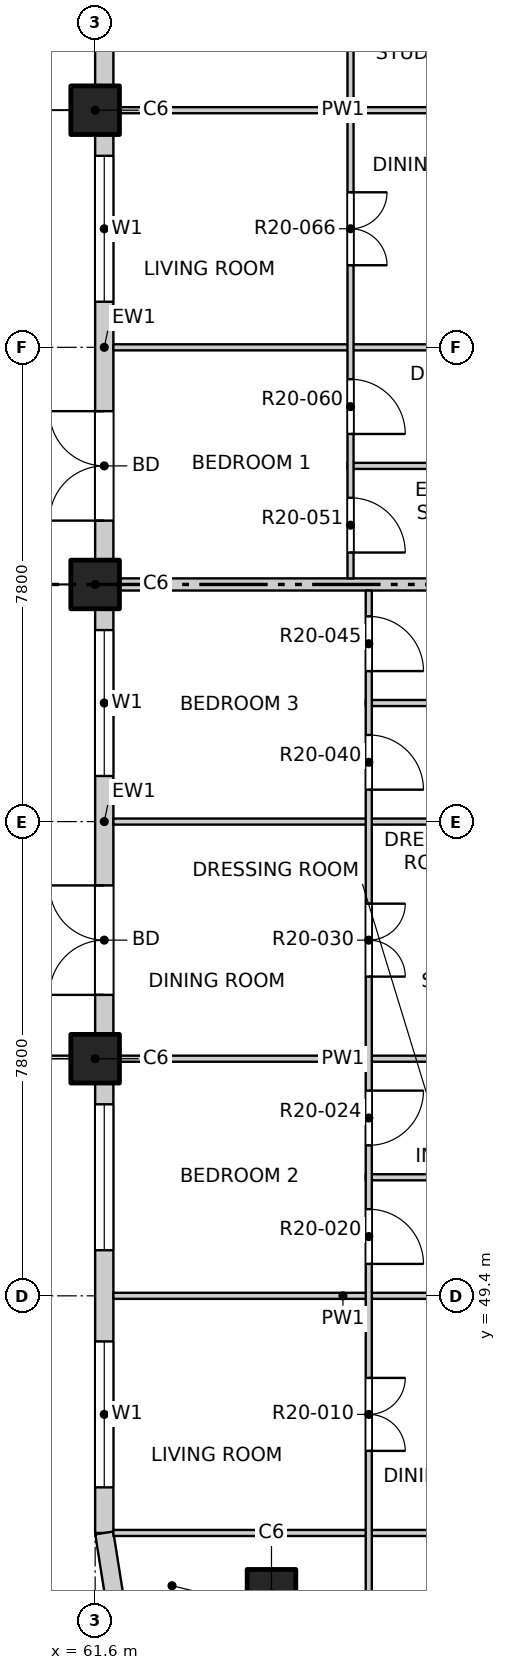
"""IFC4 building model, lengths in metres.
Left out: names, types, materials, properties, quantities, classifications, styles, units other than length and angle.
Written with IfcOpenShell. Run it as: python <this file> out.ifc"""

import sys

from ifc_helpers import new_model, si_unit, direction, frame, frame_2d, origin, origin_2d, place, context, subcontext, project, spatial, rectangle, extrude, element, fill, save


model = new_model("IFC4")
c1 = context("Model", 3, precision=1e-05, world=origin(), true_north=direction((0.0, 1.0)))
c2 = subcontext(c1, "Body", "Model", "MODEL_VIEW")
j1 = project(units=[si_unit("LENGTHUNIT", "METRE"), si_unit("PLANEANGLEUNIT", "RADIAN")], contexts=[c1])
p1 = place(None, origin())
s1 = spatial("IfcSite", under=j1, at=p1, CompositionType="ELEMENT")
p2 = place(p1, origin())
s2 = spatial("IfcBuilding", under=s1, at=p2, CompositionType="ELEMENT")
p3 = place(p2, frame((0.0, 0.0, 210.9)))
s3 = spatial("IfcBuildingStorey", under=s2, at=p3, CompositionType="ELEMENT", Elevation=210.9)
for number, where, z_axis, x_axis in (
    (1, (64.5, 44.5, -0.25), (0.0, 0.0, 1.0), (1.0, 0.0, 0.0)),
    (2, (61.6, 53.3, -0.25), (0.0, 0.0, 1.0), (1.0, 0.0, 0.0)),
    (3, (61.6, 61.1, -0.25), (0.0, 0.0, 1.0), (1.0, 0.0, 0.0)),
    (4, (61.6, 68.9, -0.25), (0.0, 0.0, 1.0), (1.0, 0.0, 0.0)),
):
    element("IfcColumn", number, at=place(p3, frame(where, z_axis=z_axis, x_axis=x_axis)), inside=s3, PredefinedType="COLUMN", context=c2, shape_type="SweptSolid", body=[
        extrude(rectangle(XDim=0.8, YDim=0.8, at=origin_2d()), origin(), (0.0, 0.0, 1.0), 3.4),
    ])
p4 = place(p3, frame((61.75, 45.5, 0.0), z_axis=(0.0, 0.0, 1.0), x_axis=(0.0, 1.0, 0.0)))
e5 = element("IfcWall", 5, at=p4, inside=s3, PredefinedType="SOLIDWALL", context=c2, shape_type="SweptSolid", body=[
    extrude(rectangle(XDim=7.4, YDim=0.3, at=frame_2d((3.7, 0.0))), origin(), (0.0, 0.0, 1.0), 2.7),
])
p5 = place(p4, frame((0.75, 0.0, 0.9)))
e6 = element("IfcOpeningElement", 6, at=p5, cuts=e5, PredefinedType="OPENING", context=c2, shape_type="SweptSolid", body=[
    extrude(rectangle(XDim=2.4, YDim=1.8, at=frame_2d((1.2, 0.9))), frame((0.0, 0.16, 0.0), z_axis=(0.0, -1.0, 0.0), x_axis=(1.0, 0.0, 0.0)), (0.0, 0.0, 1.0), 0.32),
])
p6 = place(p4, frame((4.65, 0.0, 0.9)))
e7 = element("IfcOpeningElement", 7, at=p6, cuts=e5, PredefinedType="OPENING", context=c2, shape_type="SweptSolid", body=[
    extrude(rectangle(XDim=2.4, YDim=1.8, at=frame_2d((1.2, 0.9))), frame((0.0, 0.16, 0.0), z_axis=(0.0, -1.0, 0.0), x_axis=(1.0, 0.0, 0.0)), (0.0, 0.0, 1.0), 0.32),
])
p7 = place(p3, frame((61.75, 53.7, 0.0), z_axis=(0.0, 0.0, 1.0), x_axis=(0.0, 1.0, 0.0)))
e8 = element("IfcWall", 8, at=p7, inside=s3, PredefinedType="SOLIDWALL", context=c2, shape_type="SweptSolid", body=[
    extrude(rectangle(XDim=7.0, YDim=0.3, at=frame_2d((3.5, 0.0))), origin(), (0.0, 0.0, 1.0), 2.7),
])
p8 = place(p7, frame((0.65, 0.0, 0.0)))
e9 = element("IfcOpeningElement", 9, at=p8, cuts=e8, PredefinedType="OPENING", context=c2, shape_type="SweptSolid", body=[
    extrude(rectangle(XDim=1.8, YDim=2.4, at=frame_2d((0.9, 1.2))), frame((0.0, 0.16, 0.0), z_axis=(0.0, -1.0, 0.0), x_axis=(1.0, 0.0, 0.0)), (0.0, 0.0, 1.0), 0.32),
])
p9 = place(p7, frame((4.25, 0.0, 0.9)))
e10 = element("IfcOpeningElement", 10, at=p9, cuts=e8, PredefinedType="OPENING", context=c2, shape_type="SweptSolid", body=[
    extrude(rectangle(XDim=2.4, YDim=1.8, at=frame_2d((1.2, 0.9))), frame((0.0, 0.16, 0.0), z_axis=(0.0, -1.0, 0.0), x_axis=(1.0, 0.0, 0.0)), (0.0, 0.0, 1.0), 0.32),
])
p10 = place(p3, frame((61.75, 61.5, 0.0), z_axis=(0.0, 0.0, 1.0), x_axis=(0.0, 1.0, 0.0)))
e11 = element("IfcWall", 11, at=p10, inside=s3, PredefinedType="SOLIDWALL", context=c2, shape_type="SweptSolid", body=[
    extrude(rectangle(XDim=7.0, YDim=0.3, at=frame_2d((3.5, 0.0))), origin(), (0.0, 0.0, 1.0), 2.7),
])
p11 = place(p10, frame((0.65, 0.0, 0.0)))
e12 = element("IfcOpeningElement", 12, at=p11, cuts=e11, PredefinedType="OPENING", context=c2, shape_type="SweptSolid", body=[
    extrude(rectangle(XDim=1.8, YDim=2.4, at=frame_2d((0.9, 1.2))), frame((0.0, 0.16, 0.0), z_axis=(0.0, -1.0, 0.0), x_axis=(1.0, 0.0, 0.0)), (0.0, 0.0, 1.0), 0.32),
])
p12 = place(p10, frame((4.25, 0.0, 0.9)))
e13 = element("IfcOpeningElement", 13, at=p12, cuts=e11, PredefinedType="OPENING", context=c2, shape_type="SweptSolid", body=[
    extrude(rectangle(XDim=2.4, YDim=1.8, at=frame_2d((1.2, 0.9))), frame((0.0, 0.16, 0.0), z_axis=(0.0, -1.0, 0.0), x_axis=(1.0, 0.0, 0.0)), (0.0, 0.0, 1.0), 0.32),
])
p13 = place(p3, frame((61.75, 69.3, 0.0), z_axis=(0.0, 0.0, 1.0), x_axis=(0.0, 1.0, 0.0)))
e14 = element("IfcWall", 14, at=p13, inside=s3, PredefinedType="SOLIDWALL", context=c2, shape_type="SweptSolid", body=[
    extrude(rectangle(XDim=7.0, YDim=0.3, at=frame_2d((3.5, 0.0))), origin(), (0.0, 0.0, 1.0), 2.7),
])
p14 = place(p13, frame((0.65, 0.0, 0.0)))
e15 = element("IfcOpeningElement", 15, at=p14, cuts=e14, PredefinedType="OPENING", context=c2, shape_type="SweptSolid", body=[
    extrude(rectangle(XDim=1.8, YDim=2.4, at=frame_2d((0.9, 1.2))), frame((0.0, 0.16, 0.0), z_axis=(0.0, -1.0, 0.0), x_axis=(1.0, 0.0, 0.0)), (0.0, 0.0, 1.0), 0.32),
])
p15 = place(p13, frame((4.25, 0.0, 0.9)))
e16 = element("IfcOpeningElement", 16, at=p15, cuts=e14, PredefinedType="OPENING", context=c2, shape_type="SweptSolid", body=[
    extrude(rectangle(XDim=2.4, YDim=1.8, at=frame_2d((1.2, 0.9))), frame((0.0, 0.16, 0.0), z_axis=(0.0, -1.0, 0.0), x_axis=(1.0, 0.0, 0.0)), (0.0, 0.0, 1.0), 0.32),
])
p16 = place(p3, frame((61.75, 45.5, 0.0), z_axis=(0.0, 0.0, 1.0), x_axis=(0.156496880861, -0.987678452879, 0.0)))
e17 = element("IfcWall", 17, at=p16, inside=s3, PredefinedType="SOLIDWALL", context=c2, shape_type="SweptSolid", body=[
    extrude(rectangle(XDim=1.173, YDim=0.3, at=frame_2d((0.586, 0.0))), origin(), (0.0, 0.0, 1.0), 2.7),
])
p17 = place(p3, frame((61.9, 45.5, 0.0), z_axis=(0.0, 0.0, 1.0), x_axis=(1.0, 0.0, 0.0)))
e18 = element("IfcWall", 18, at=p17, inside=s3, PredefinedType="PARTITIONING", context=c2, shape_type="SweptSolid", body=[
    extrude(rectangle(XDim=11.475, YDim=0.1, at=frame_2d((5.737, 0.0))), origin(), (0.0, 0.0, 1.0), 3.15),
])
p18 = place(p17, frame((7.965, 0.0, 0.0)))
e19 = element("IfcOpeningElement", 19, at=p18, cuts=e18, PredefinedType="OPENING", context=c2, shape_type="SweptSolid", body=[
    extrude(rectangle(XDim=0.9, YDim=2.1, at=frame_2d((0.45, 1.05))), frame((0.0, 0.06, 0.0), z_axis=(0.0, -1.0, 0.0), x_axis=(1.0, 0.0, 0.0)), (0.0, 0.0, 1.0), 0.12),
])
p19 = place(p3, frame((61.9, 49.4, 0.0), z_axis=(0.0, 0.0, 1.0), x_axis=(1.0, 0.0, 0.0)))
e20 = element("IfcWall", 20, at=p19, inside=s3, PredefinedType="PARTITIONING", context=c2, shape_type="SweptSolid", body=[
    extrude(rectangle(XDim=7.55, YDim=0.1, at=frame_2d((3.775, 0.0))), origin(), (0.0, 0.0, 1.0), 3.15),
])
p20 = place(p3, frame((66.05, 51.35, 0.0), z_axis=(0.0, 0.0, 1.0), x_axis=(1.0, 0.0, 0.0)))
e21 = element("IfcWall", 21, at=p20, inside=s3, PredefinedType="PARTITIONING", context=c2, shape_type="SweptSolid", body=[
    extrude(rectangle(XDim=3.4, YDim=0.1, at=frame_2d((1.7, 0.0))), origin(), (0.0, 0.0, 1.0), 3.15),
])
for number, where, z_axis, x_axis in (
    (22, (61.9, 53.3, 0.0), (0.0, 0.0, 1.0), (1.0, 0.0, 0.0)),
    (23, (61.9, 57.2, 0.0), (0.0, 0.0, 1.0), (1.0, 0.0, 0.0)),
):
    element("IfcWall", number, at=place(p3, frame(where, z_axis=z_axis, x_axis=x_axis)), inside=s3, PredefinedType="PARTITIONING", context=c2, shape_type="SweptSolid", body=[
        extrude(rectangle(XDim=7.55, YDim=0.1, at=frame_2d((3.775, 0.0))), origin(), (0.0, 0.0, 1.0), 3.15),
    ])
p21 = place(p3, frame((66.05, 59.15, 0.0), z_axis=(0.0, 0.0, 1.0), x_axis=(1.0, 0.0, 0.0)))
e24 = element("IfcWall", 24, at=p21, inside=s3, PredefinedType="PARTITIONING", context=c2, shape_type="SweptSolid", body=[
    extrude(rectangle(XDim=3.4, YDim=0.1, at=frame_2d((1.7, 0.0))), origin(), (0.0, 0.0, 1.0), 3.15),
])
p22 = place(p3, frame((61.9, 61.1, 0.0), z_axis=(0.0, 0.0, 1.0), x_axis=(1.0, 0.0, 0.0)))
e25 = element("IfcWall", 25, at=p22, inside=s3, PredefinedType="PARTITIONING", context=c2, shape_type="SweptSolid", body=[
    extrude(rectangle(XDim=11.5, YDim=0.2, at=frame_2d((5.75, 0.0))), origin(), (0.0, 0.0, 1.0), 2.55),
])
p23 = place(p3, frame((65.75, 63.05, 0.0), z_axis=(0.0, 0.0, 1.0), x_axis=(1.0, 0.0, 0.0)))
e26 = element("IfcWall", 26, at=p23, inside=s3, PredefinedType="PARTITIONING", context=c2, shape_type="SweptSolid", body=[
    extrude(rectangle(XDim=3.7, YDim=0.1, at=frame_2d((1.85, 0.0))), origin(), (0.0, 0.0, 1.0), 3.15),
])
p24 = place(p3, frame((61.9, 65.0, 0.0), z_axis=(0.0, 0.0, 1.0), x_axis=(1.0, 0.0, 0.0)))
e27 = element("IfcWall", 27, at=p24, inside=s3, PredefinedType="PARTITIONING", context=c2, shape_type="SweptSolid", body=[
    extrude(rectangle(XDim=7.55, YDim=0.1, at=frame_2d((3.775, 0.0))), origin(), (0.0, 0.0, 1.0), 3.15),
])
p25 = place(p3, frame((61.9, 68.9, 0.0), z_axis=(0.0, 0.0, 1.0), x_axis=(1.0, 0.0, 0.0)))
e28 = element("IfcWall", 28, at=p25, inside=s3, PredefinedType="PARTITIONING", context=c2, shape_type="SweptSolid", body=[
    extrude(rectangle(XDim=7.55, YDim=0.1, at=frame_2d((3.775, 0.0))), origin(), (0.0, 0.0, 1.0), 2.55),
])
p26 = place(p3, frame((65.8, 61.2, 0.0), z_axis=(0.0, 0.0, 1.0), x_axis=(0.0, 1.0, 0.0)))
e29 = element("IfcWall", 29, at=p26, inside=s3, PredefinedType="PARTITIONING", context=c2, shape_type="SweptSolid", body=[
    extrude(rectangle(XDim=26.9, YDim=0.1, at=frame_2d((13.45, 0.0))), origin(), (0.0, 0.0, 1.0), 3.15),
])
p27 = place(p26, frame((0.425, 0.0, 0.0)))
e30 = element("IfcOpeningElement", 30, at=p27, cuts=e29, PredefinedType="OPENING", context=c2, shape_type="SweptSolid", body=[
    extrude(rectangle(XDim=0.9, YDim=2.1, at=frame_2d((0.45, 1.05))), frame((0.0, 0.06, 0.0), z_axis=(0.0, -1.0, 0.0), x_axis=(1.0, 0.0, 0.0)), (0.0, 0.0, 1.0), 0.12),
])
p28 = place(p26, frame((2.375, 0.0, 0.0)))
e31 = element("IfcOpeningElement", 31, at=p28, cuts=e29, PredefinedType="OPENING", context=c2, shape_type="SweptSolid", body=[
    extrude(rectangle(XDim=0.9, YDim=2.1, at=frame_2d((0.45, 1.05))), frame((0.0, 0.06, 0.0), z_axis=(0.0, -1.0, 0.0), x_axis=(1.0, 0.0, 0.0)), (0.0, 0.0, 1.0), 0.12),
])
p29 = place(p26, frame((5.15, 0.0, 0.0)))
e32 = element("IfcOpeningElement", 32, at=p29, cuts=e29, PredefinedType="OPENING", context=c2, shape_type="SweptSolid", body=[
    extrude(rectangle(XDim=1.2, YDim=2.1, at=frame_2d((0.6, 1.05))), frame((0.0, 0.06, 0.0), z_axis=(0.0, -1.0, 0.0), x_axis=(1.0, 0.0, 0.0)), (0.0, 0.0, 1.0), 0.12),
])
p30 = place(p26, frame((9.05, 0.0, 0.0)))
e33 = element("IfcOpeningElement", 33, at=p30, cuts=e29, PredefinedType="OPENING", context=c2, shape_type="SweptSolid", body=[
    extrude(rectangle(XDim=1.2, YDim=2.1, at=frame_2d((0.6, 1.05))), frame((0.0, 0.06, 0.0), z_axis=(0.0, -1.0, 0.0), x_axis=(1.0, 0.0, 0.0)), (0.0, 0.0, 1.0), 0.12),
])
p31 = place(p26, frame((12.125, 0.0, 0.0)))
e34 = element("IfcOpeningElement", 34, at=p31, cuts=e29, PredefinedType="OPENING", context=c2, shape_type="SweptSolid", body=[
    extrude(rectangle(XDim=0.9, YDim=2.1, at=frame_2d((0.45, 1.05))), frame((0.0, 0.06, 0.0), z_axis=(0.0, -1.0, 0.0), x_axis=(1.0, 0.0, 0.0)), (0.0, 0.0, 1.0), 0.12),
])
p32 = place(p26, frame((14.075, 0.0, 0.0)))
e35 = element("IfcOpeningElement", 35, at=p32, cuts=e29, PredefinedType="OPENING", context=c2, shape_type="SweptSolid", body=[
    extrude(rectangle(XDim=0.9, YDim=2.1, at=frame_2d((0.45, 1.05))), frame((0.0, 0.06, 0.0), z_axis=(0.0, -1.0, 0.0), x_axis=(1.0, 0.0, 0.0)), (0.0, 0.0, 1.0), 0.12),
])
p33 = place(p26, frame((16.025, 0.0, 0.0)))
e36 = element("IfcOpeningElement", 36, at=p33, cuts=e29, PredefinedType="OPENING", context=c2, shape_type="SweptSolid", body=[
    extrude(rectangle(XDim=0.9, YDim=2.1, at=frame_2d((0.45, 1.05))), frame((0.0, 0.06, 0.0), z_axis=(0.0, -1.0, 0.0), x_axis=(1.0, 0.0, 0.0)), (0.0, 0.0, 1.0), 0.12),
])
p34 = place(p26, frame((17.975, 0.0, 0.0)))
e37 = element("IfcOpeningElement", 37, at=p34, cuts=e29, PredefinedType="OPENING", context=c2, shape_type="SweptSolid", body=[
    extrude(rectangle(XDim=0.9, YDim=2.1, at=frame_2d((0.45, 1.05))), frame((0.0, 0.06, 0.0), z_axis=(0.0, -1.0, 0.0), x_axis=(1.0, 0.0, 0.0)), (0.0, 0.0, 1.0), 0.12),
])
p35 = place(p26, frame((20.75, 0.0, 0.0)))
e38 = element("IfcOpeningElement", 38, at=p35, cuts=e29, PredefinedType="OPENING", context=c2, shape_type="SweptSolid", body=[
    extrude(rectangle(XDim=1.2, YDim=2.1, at=frame_2d((0.6, 1.05))), frame((0.0, 0.06, 0.0), z_axis=(0.0, -1.0, 0.0), x_axis=(1.0, 0.0, 0.0)), (0.0, 0.0, 1.0), 0.12),
])
p36 = place(p26, frame((24.65, 0.0, 0.0)))
e39 = element("IfcOpeningElement", 39, at=p36, cuts=e29, PredefinedType="OPENING", context=c2, shape_type="SweptSolid", body=[
    extrude(rectangle(XDim=1.2, YDim=2.1, at=frame_2d((0.6, 1.05))), frame((0.0, 0.06, 0.0), z_axis=(0.0, -1.0, 0.0), x_axis=(1.0, 0.0, 0.0)), (0.0, 0.0, 1.0), 0.12),
])
p37 = place(p3, frame((66.1, 41.9, 0.0), z_axis=(0.0, 0.0, 1.0), x_axis=(0.0, 1.0, 0.0)))
e40 = element("IfcWall", 40, at=p37, inside=s3, PredefinedType="PARTITIONING", context=c2, shape_type="SweptSolid", body=[
    extrude(rectangle(XDim=19.1, YDim=0.1, at=frame_2d((9.55, 0.0))), origin(), (0.0, 0.0, 1.0), 3.15),
])
p38 = place(p37, frame((1.05, 0.0, 0.0)))
e41 = element("IfcOpeningElement", 41, at=p38, cuts=e40, PredefinedType="OPENING", context=c2, shape_type="SweptSolid", body=[
    extrude(rectangle(XDim=1.2, YDim=2.1, at=frame_2d((0.6, 1.05))), frame((0.0, 0.06, 0.0), z_axis=(0.0, -1.0, 0.0), x_axis=(1.0, 0.0, 0.0)), (0.0, 0.0, 1.0), 0.12),
])
p39 = place(p37, frame((4.95, 0.0, 0.0)))
e42 = element("IfcOpeningElement", 42, at=p39, cuts=e40, PredefinedType="OPENING", context=c2, shape_type="SweptSolid", body=[
    extrude(rectangle(XDim=1.2, YDim=2.1, at=frame_2d((0.6, 1.05))), frame((0.0, 0.06, 0.0), z_axis=(0.0, -1.0, 0.0), x_axis=(1.0, 0.0, 0.0)), (0.0, 0.0, 1.0), 0.12),
])
p40 = place(p37, frame((8.025, 0.0, 0.0)))
e43 = element("IfcOpeningElement", 43, at=p40, cuts=e40, PredefinedType="OPENING", context=c2, shape_type="SweptSolid", body=[
    extrude(rectangle(XDim=0.9, YDim=2.1, at=frame_2d((0.45, 1.05))), frame((0.0, 0.06, 0.0), z_axis=(0.0, -1.0, 0.0), x_axis=(1.0, 0.0, 0.0)), (0.0, 0.0, 1.0), 0.12),
])
p41 = place(p37, frame((9.975, 0.0, 0.0)))
e44 = element("IfcOpeningElement", 44, at=p41, cuts=e40, PredefinedType="OPENING", context=c2, shape_type="SweptSolid", body=[
    extrude(rectangle(XDim=0.9, YDim=2.1, at=frame_2d((0.45, 1.05))), frame((0.0, 0.06, 0.0), z_axis=(0.0, -1.0, 0.0), x_axis=(1.0, 0.0, 0.0)), (0.0, 0.0, 1.0), 0.12),
])
p42 = place(p37, frame((12.75, 0.0, 0.0)))
e45 = element("IfcOpeningElement", 45, at=p42, cuts=e40, PredefinedType="OPENING", context=c2, shape_type="SweptSolid", body=[
    extrude(rectangle(XDim=1.2, YDim=2.1, at=frame_2d((0.6, 1.05))), frame((0.0, 0.06, 0.0), z_axis=(0.0, -1.0, 0.0), x_axis=(1.0, 0.0, 0.0)), (0.0, 0.0, 1.0), 0.12),
])
p43 = place(p37, frame((15.825, 0.0, 0.0)))
e46 = element("IfcOpeningElement", 46, at=p43, cuts=e40, PredefinedType="OPENING", context=c2, shape_type="SweptSolid", body=[
    extrude(rectangle(XDim=0.9, YDim=2.1, at=frame_2d((0.45, 1.05))), frame((0.0, 0.06, 0.0), z_axis=(0.0, -1.0, 0.0), x_axis=(1.0, 0.0, 0.0)), (0.0, 0.0, 1.0), 0.12),
])
p44 = place(p37, frame((17.775, 0.0, 0.0)))
e47 = element("IfcOpeningElement", 47, at=p44, cuts=e40, PredefinedType="OPENING", context=c2, shape_type="SweptSolid", body=[
    extrude(rectangle(XDim=0.9, YDim=2.1, at=frame_2d((0.45, 1.05))), frame((0.0, 0.06, 0.0), z_axis=(0.0, -1.0, 0.0), x_axis=(1.0, 0.0, 0.0)), (0.0, 0.0, 1.0), 0.12),
])
p45 = place(p5, origin())
e48 = element("IfcWindow", 48, at=p45, inside=s3, PartitioningType="DOUBLE_PANEL_VERTICAL", PredefinedType="WINDOW", context=c2, shape_type="SweptSolid", body=[
    extrude(rectangle(XDim=2.4, YDim=1.8, at=frame_2d((1.2, 0.9))), frame((0.0, 0.03, 0.0), z_axis=(0.0, -1.0, 0.0), x_axis=(1.0, 0.0, 0.0)), (0.0, 0.0, 1.0), 0.06),
])
fill(e6, e48)
p46 = place(p6, origin())
e49 = element("IfcWindow", 49, at=p46, inside=s3, PartitioningType="DOUBLE_PANEL_VERTICAL", PredefinedType="WINDOW", context=c2, shape_type="SweptSolid", body=[
    extrude(rectangle(XDim=2.4, YDim=1.8, at=frame_2d((1.2, 0.9))), frame((0.0, 0.03, 0.0), z_axis=(0.0, -1.0, 0.0), x_axis=(1.0, 0.0, 0.0)), (0.0, 0.0, 1.0), 0.06),
])
fill(e7, e49)
p47 = place(p8, origin())
e50 = element("IfcDoor", 50, at=p47, inside=s3, OperationType="DOUBLE_DOOR_SINGLE_SWING", PredefinedType="DOOR", context=c2, shape_type="SweptSolid", body=[
    extrude(rectangle(XDim=1.8, YDim=2.4, at=frame_2d((0.9, 1.2))), frame((0.0, 0.025, 0.0), z_axis=(0.0, -1.0, 0.0), x_axis=(1.0, 0.0, 0.0)), (0.0, 0.0, 1.0), 0.05),
])
fill(e9, e50)
p48 = place(p9, origin())
e51 = element("IfcWindow", 51, at=p48, inside=s3, PartitioningType="DOUBLE_PANEL_VERTICAL", PredefinedType="WINDOW", context=c2, shape_type="SweptSolid", body=[
    extrude(rectangle(XDim=2.4, YDim=1.8, at=frame_2d((1.2, 0.9))), frame((0.0, 0.03, 0.0), z_axis=(0.0, -1.0, 0.0), x_axis=(1.0, 0.0, 0.0)), (0.0, 0.0, 1.0), 0.06),
])
fill(e10, e51)
p49 = place(p11, origin())
e52 = element("IfcDoor", 52, at=p49, inside=s3, OperationType="DOUBLE_DOOR_SINGLE_SWING", PredefinedType="DOOR", context=c2, shape_type="SweptSolid", body=[
    extrude(rectangle(XDim=1.8, YDim=2.4, at=frame_2d((0.9, 1.2))), frame((0.0, 0.025, 0.0), z_axis=(0.0, -1.0, 0.0), x_axis=(1.0, 0.0, 0.0)), (0.0, 0.0, 1.0), 0.05),
])
fill(e12, e52)
p50 = place(p12, origin())
e53 = element("IfcWindow", 53, at=p50, inside=s3, PartitioningType="DOUBLE_PANEL_VERTICAL", PredefinedType="WINDOW", context=c2, shape_type="SweptSolid", body=[
    extrude(rectangle(XDim=2.4, YDim=1.8, at=frame_2d((1.2, 0.9))), frame((0.0, 0.03, 0.0), z_axis=(0.0, -1.0, 0.0), x_axis=(1.0, 0.0, 0.0)), (0.0, 0.0, 1.0), 0.06),
])
fill(e13, e53)
p51 = place(p39, origin())
e54 = element("IfcDoor", 54, at=p51, inside=s3, OperationType="DOUBLE_DOOR_SINGLE_SWING", PredefinedType="DOOR", context=c2, shape_type="SweptSolid", body=[
    extrude(rectangle(XDim=1.2, YDim=2.1, at=frame_2d((0.6, 1.05))), frame((0.0, 0.025, 0.0), z_axis=(0.0, -1.0, 0.0), x_axis=(1.0, 0.0, 0.0)), (0.0, 0.0, 1.0), 0.05),
])
fill(e42, e54)
p52 = place(p40, origin())
e55 = element("IfcDoor", 55, at=p52, inside=s3, OperationType="SINGLE_SWING_RIGHT", PredefinedType="DOOR", context=c2, shape_type="SweptSolid", body=[
    extrude(rectangle(XDim=0.9, YDim=2.1, at=frame_2d((0.45, 1.05))), frame((0.0, 0.025, 0.0), z_axis=(0.0, -1.0, 0.0), x_axis=(1.0, 0.0, 0.0)), (0.0, 0.0, 1.0), 0.05),
])
fill(e43, e55)
p53 = place(p41, origin())
e56 = element("IfcDoor", 56, at=p53, inside=s3, OperationType="SINGLE_SWING_LEFT", PredefinedType="DOOR", context=c2, shape_type="SweptSolid", body=[
    extrude(rectangle(XDim=0.9, YDim=2.1, at=frame_2d((0.45, 1.05))), frame((0.0, 0.025, 0.0), z_axis=(0.0, -1.0, 0.0), x_axis=(1.0, 0.0, 0.0)), (0.0, 0.0, 1.0), 0.05),
])
fill(e44, e56)
p54 = place(p42, origin())
e57 = element("IfcDoor", 57, at=p54, inside=s3, OperationType="DOUBLE_DOOR_SINGLE_SWING", PredefinedType="DOOR", context=c2, shape_type="SweptSolid", body=[
    extrude(rectangle(XDim=1.2, YDim=2.1, at=frame_2d((0.6, 1.05))), frame((0.0, 0.025, 0.0), z_axis=(0.0, -1.0, 0.0), x_axis=(1.0, 0.0, 0.0)), (0.0, 0.0, 1.0), 0.05),
])
fill(e45, e57)
p55 = place(p43, origin())
e58 = element("IfcDoor", 58, at=p55, inside=s3, OperationType="SINGLE_SWING_RIGHT", PredefinedType="DOOR", context=c2, shape_type="SweptSolid", body=[
    extrude(rectangle(XDim=0.9, YDim=2.1, at=frame_2d((0.45, 1.05))), frame((0.0, 0.025, 0.0), z_axis=(0.0, -1.0, 0.0), x_axis=(1.0, 0.0, 0.0)), (0.0, 0.0, 1.0), 0.05),
])
fill(e46, e58)
p56 = place(p44, origin())
e59 = element("IfcDoor", 59, at=p56, inside=s3, OperationType="SINGLE_SWING_RIGHT", PredefinedType="DOOR", context=c2, shape_type="SweptSolid", body=[
    extrude(rectangle(XDim=0.9, YDim=2.1, at=frame_2d((0.45, 1.05))), frame((0.0, 0.025, 0.0), z_axis=(0.0, -1.0, 0.0), x_axis=(1.0, 0.0, 0.0)), (0.0, 0.0, 1.0), 0.05),
])
fill(e47, e59)
p57 = place(p27, origin())
e60 = element("IfcDoor", 60, at=p57, inside=s3, OperationType="SINGLE_SWING_RIGHT", PredefinedType="DOOR", context=c2, shape_type="SweptSolid", body=[
    extrude(rectangle(XDim=0.9, YDim=2.1, at=frame_2d((0.45, 1.05))), frame((0.0, 0.025, 0.0), z_axis=(0.0, -1.0, 0.0), x_axis=(1.0, 0.0, 0.0)), (0.0, 0.0, 1.0), 0.05),
])
fill(e30, e60)
p58 = place(p28, origin())
e61 = element("IfcDoor", 61, at=p58, inside=s3, OperationType="SINGLE_SWING_RIGHT", PredefinedType="DOOR", context=c2, shape_type="SweptSolid", body=[
    extrude(rectangle(XDim=0.9, YDim=2.1, at=frame_2d((0.45, 1.05))), frame((0.0, 0.025, 0.0), z_axis=(0.0, -1.0, 0.0), x_axis=(1.0, 0.0, 0.0)), (0.0, 0.0, 1.0), 0.05),
])
fill(e31, e61)
p59 = place(p29, origin())
e62 = element("IfcDoor", 62, at=p59, inside=s3, OperationType="DOUBLE_DOOR_SINGLE_SWING", PredefinedType="DOOR", context=c2, shape_type="SweptSolid", body=[
    extrude(rectangle(XDim=1.2, YDim=2.1, at=frame_2d((0.6, 1.05))), frame((0.0, 0.025, 0.0), z_axis=(0.0, -1.0, 0.0), x_axis=(1.0, 0.0, 0.0)), (0.0, 0.0, 1.0), 0.05),
])
fill(e32, e62)
save(model, sys.argv[1])
